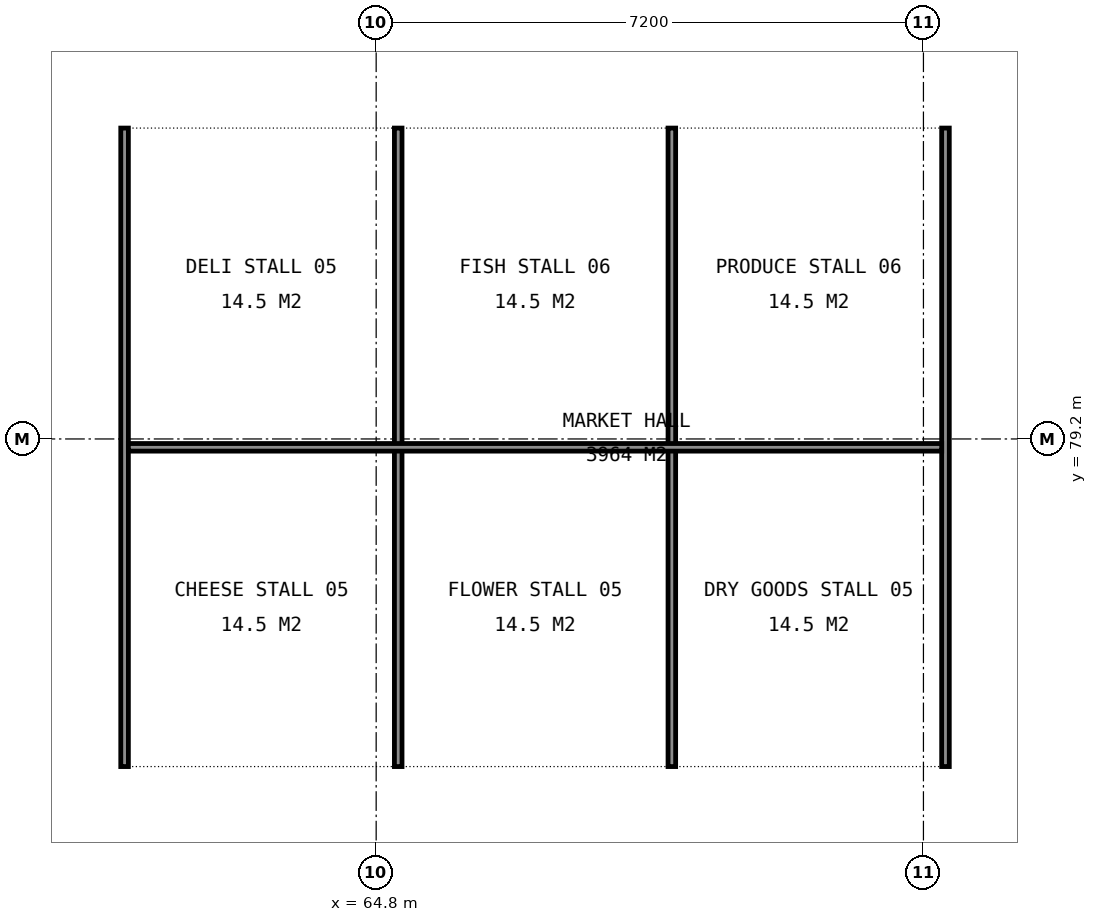
"""IFC4 building model, lengths in metres.
Left out: names, types, materials, properties, quantities, classifications, styles, units other than length and angle.
Written with IfcOpenShell. Run it as: python <this file> out.ifc"""

import sys

from ifc_helpers import new_model, si_unit, direction, frame, frame_2d, origin, place, context, subcontext, project, spatial, rectangle, extrude, element, save


model = new_model("IFC4")
c1 = context("Model", 3, precision=1e-05, world=origin(), true_north=direction((0.0, 1.0)))
c2 = subcontext(c1, "Body", "Model", "MODEL_VIEW")
j1 = project(units=[si_unit("LENGTHUNIT", "METRE"), si_unit("PLANEANGLEUNIT", "RADIAN")], contexts=[c1])
p1 = place(None, origin())
s1 = spatial("IfcSite", under=j1, at=p1, CompositionType="ELEMENT")
p2 = place(p1, origin())
s2 = spatial("IfcBuilding", under=s1, at=p2, CompositionType="ELEMENT")
p3 = place(p2, origin())
s3 = spatial("IfcBuildingStorey", under=s2, at=p3, CompositionType="ELEMENT", Elevation=0.0)
for number, where, z_axis, x_axis in (
    (1, (61.49, 74.89, 0.0), (0.0, 0.0, 1.0), (0.0, 1.0, 0.0)),
    (2, (65.09, 74.89, 0.0), (0.0, 0.0, 1.0), (0.0, 1.0, 0.0)),
    (3, (68.69, 74.89, 0.0), (0.0, 0.0, 1.0), (0.0, 1.0, 0.0)),
    (4, (72.29, 74.89, 0.0), (0.0, 0.0, 1.0), (0.0, 1.0, 0.0)),
):
    element("IfcWall", number, at=place(p3, frame(where, z_axis=z_axis, x_axis=x_axis)), inside=s3, PredefinedType="PARTITIONING", context=c2, shape_type="SweptSolid", body=[
        extrude(rectangle(XDim=8.4, YDim=0.1, at=frame_2d((4.2, 0.0))), origin(), (0.0, 0.0, 1.0), 1.2),
    ])
p4 = place(p3, frame((61.54, 79.09, 0.0), z_axis=(0.0, 0.0, 1.0), x_axis=(1.0, 0.0, 0.0)))
e5 = element("IfcWall", 5, at=p4, inside=s3, PredefinedType="PARTITIONING", context=c2, shape_type="SweptSolid", body=[
    extrude(rectangle(XDim=10.7, YDim=0.1, at=frame_2d((5.35, 0.0))), origin(), (0.0, 0.0, 1.0), 1.2),
])
save(model, sys.argv[1])
